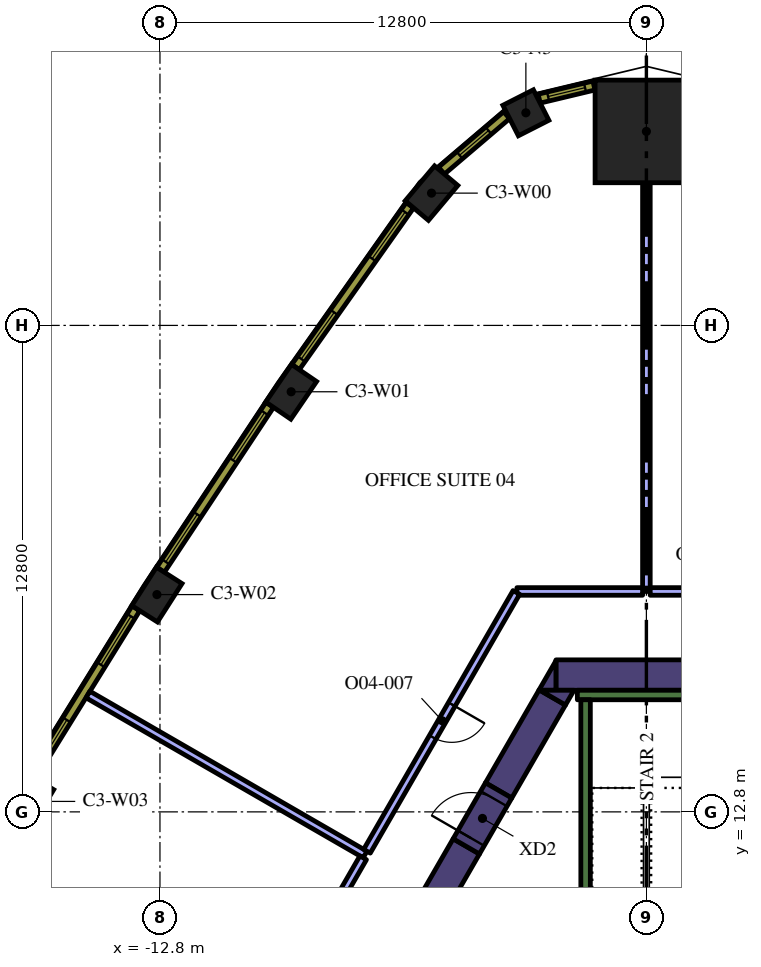
"""IFC4 building model, lengths in metres.
Left out: names, types, materials, properties, quantities, classifications, styles, units other than length and angle.
Written with IfcOpenShell. Run it as: python <this file> out.ifc"""

import sys

from ifc_helpers import new_model, si_unit, direction, frame, frame_2d, origin, origin_2d, place, context, subcontext, project, spatial, polyline, rectangle, outline, extrude, element, fill, save


model = new_model("IFC4")
c1 = context("Model", 3, precision=1e-05, world=origin(), true_north=direction((0.0, 1.0)))
c2 = subcontext(c1, "Body", "Model", "MODEL_VIEW")
j1 = project(units=[si_unit("LENGTHUNIT", "METRE"), si_unit("PLANEANGLEUNIT", "RADIAN")], contexts=[c1])
p1 = place(None, origin())
s1 = spatial("IfcSite", under=j1, at=p1, CompositionType="ELEMENT")
p2 = place(p1, origin())
s2 = spatial("IfcBuilding", under=s1, at=p2, CompositionType="ELEMENT")
p3 = place(p2, frame((0.0, 0.0, 183.6)))
s3 = spatial("IfcBuildingStorey", under=s2, at=p3, CompositionType="ELEMENT", Elevation=183.6)
p4 = place(p3, frame((0.0, 30.704, 0.0), z_axis=(0.0, 0.0, 1.0), x_axis=(0.0, 1.0, 0.0)))
e1 = element("IfcColumn", 1, at=p4, inside=s3, PredefinedType="COLUMN", context=c2, shape_type="SweptSolid", body=[
    extrude(rectangle(XDim=2.7, YDim=2.7, at=origin_2d()), origin(), (0.0, 0.0, 1.0), 4.2),
])
p5 = place(p3, frame((-3.171, 31.195, 0.0), z_axis=(0.0, 0.0, 1.0), x_axis=(-0.891486197647, -0.453047855535, 0.0)))
e2 = element("IfcColumn", 2, at=p5, inside=s3, PredefinedType="COLUMN", context=c2, shape_type="SweptSolid", body=[
    extrude(rectangle(XDim=0.9, YDim=0.9, at=origin_2d()), origin(), (0.0, 0.0, 1.0), 4.2),
])
for number, where, z_axis, x_axis in (
    (3, (-5.654, 29.081, 0.0), (0.0, 0.0, 1.0), (-0.644, -0.765, 0.0)),
    (4, (-9.348, 23.854, 0.0), (0.0, 0.0, 1.0), (-0.565, -0.825, 0.0)),
    (5, (-12.88, 18.517, 0.0), (0.0, 0.0, 1.0), (-0.539, -0.842, 0.0)),
    (6, (-16.247, 13.075, 0.0), (0.0, 0.0, 1.0), (-0.513, -0.858, 0.0)),
):
    element("IfcColumn", number, at=place(p3, frame(where, z_axis=z_axis, x_axis=x_axis)), inside=s3, PredefinedType="COLUMN", context=c2, shape_type="SweptSolid", body=[
        extrude(rectangle(XDim=1.2, YDim=0.8, at=origin_2d()), origin(), (0.0, 0.0, 1.0), 4.2),
    ])
p6 = place(p3, frame((-2.379, 16.4, 0.0), z_axis=(0.0, 0.0, 1.0), x_axis=(1.0, 0.0, 0.0)))
e7 = element("IfcWall", 7, at=p6, inside=s3, PredefinedType="SOLIDWALL", context=c2, shape_type="SweptSolid", body=[
    extrude(rectangle(XDim=3.824, YDim=0.8, at=frame_2d((1.912, 0.0))), origin(), (0.0, 0.0, 1.0), 4.2),
])
p7 = place(p3, origin())
e8 = element("IfcWall", 8, at=p7, inside=s3, PredefinedType="SOLIDWALL", context=c2, shape_type="SweptSolid", body=[
    extrude(outline(polyline([(-2.829, 16.0), (-2.381, 16.776), (-2.381, 16.0), (-2.829, 16.0)])), origin(), (0.0, 0.0, 1.0), 4.2),
])
p8 = place(p3, frame((-2.477, 15.81, 0.0), z_axis=(0.0, 0.0, 1.0), x_axis=(-0.499969377405, -0.866043083026, 0.0)))
e9 = element("IfcWall", 9, at=p8, inside=s3, PredefinedType="SOLIDWALL", context=c2, shape_type="SweptSolid", body=[
    extrude(rectangle(XDim=2.824, YDim=0.8, at=frame_2d((1.412, 0.0))), origin(), (0.0, 0.0, 1.0), 4.2),
])
e10 = element("IfcWall", 10, at=p7, inside=s3, PredefinedType="SOLIDWALL", context=c2, shape_type="SweptSolid", body=[
    extrude(outline(polyline([(-1.905, 16.0), (-2.129, 15.612), (-2.801, 16.0), (-1.905, 16.0)])), origin(), (0.0, 0.0, 1.0), 4.2),
])
p9 = place(p3, frame((-12.668, -1.842, 0.0), z_axis=(0.0, 0.0, 1.0), x_axis=(0.500003640647, 0.866023301845, 0.0)))
e11 = element("IfcWall", 11, at=p9, inside=s3, PredefinedType="SOLIDWALL", context=c2, shape_type="SweptSolid", body=[
    extrude(rectangle(XDim=15.858, YDim=0.8, at=frame_2d((7.929, 0.0))), origin(), (0.0, 0.0, 1.0), 4.2),
])
p10 = place(p3, frame((-1.817, 15.875, 0.0), z_axis=(0.0, 0.0, 1.0), x_axis=(1.0, 0.0, 0.0)))
e12 = element("IfcWall", 12, at=p10, inside=s3, PredefinedType="SOLIDWALL", context=c2, shape_type="SweptSolid", body=[
    extrude(rectangle(XDim=3.634, YDim=0.25, at=frame_2d((1.817, 0.0))), origin(), (0.0, 0.0, 1.0), 4.2),
])
p11 = place(p3, frame((-1.6, 8.7, 0.0), z_axis=(0.0, 0.0, 1.0), x_axis=(0.0, 1.0, 0.0)))
e13 = element("IfcWall", 13, at=p11, inside=s3, PredefinedType="SOLIDWALL", context=c2, shape_type="SweptSolid", body=[
    extrude(rectangle(XDim=7.05, YDim=0.25, at=frame_2d((3.525, 0.0))), origin(), (0.0, 0.0, 1.0), 4.2),
])
p12 = place(p3, frame((-4.739, 11.892, 0.0), z_axis=(0.0, 0.0, 1.0), x_axis=(0.500062241894, 0.865989465428, 0.0)))
e14 = element("IfcWall", 14, at=p12, inside=s3, PredefinedType="SOLIDWALL", context=c2, shape_type="SweptSolid", body=[
    extrude(rectangle(XDim=1.7, YDim=0.8, at=frame_2d((0.85, 0.0))), origin(), (0.0, 0.0, 1.0), 4.2),
])
p13 = place(p12, frame((0.25, 0.0, 0.0)))
e15 = element("IfcOpeningElement", 15, at=p13, cuts=e14, PredefinedType="OPENING", context=c2, shape_type="SweptSolid", body=[
    extrude(rectangle(XDim=1.2, YDim=2.1, at=frame_2d((0.6, 1.05))), frame((0.0, 0.41, 0.0), z_axis=(0.0, -1.0, 0.0), x_axis=(1.0, 0.0, 0.0)), (0.0, 0.0, 1.0), 0.82),
])
p14 = place(p3, frame((0.0, 18.6, 0.0), z_axis=(0.0, 0.0, 1.0), x_axis=(0.0, 1.0, 0.0)))
e16 = element("IfcWall", 16, at=p14, inside=s3, PredefinedType="PARTITIONING", context=c2, shape_type="SweptSolid", body=[
    extrude(rectangle(XDim=10.754, YDim=0.2, at=frame_2d((5.377, 0.0))), origin(), (0.0, 0.0, 1.0), 3.15),
])
p15 = place(p3, frame((3.274, 18.6, 0.0), z_axis=(0.0, 0.0, 1.0), x_axis=(-1.0, 0.0, 0.0)))
e17 = element("IfcWall", 17, at=p15, inside=s3, PredefinedType="PARTITIONING", context=c2, shape_type="SweptSolid", body=[
    extrude(rectangle(XDim=3.174, YDim=0.2, at=frame_2d((1.587, 0.0))), origin(), (0.0, 0.0, 1.0), 3.15),
])
p16 = place(p15, frame((1.1, 0.0, 0.0)))
e18 = element("IfcOpeningElement", 18, at=p16, cuts=e17, PredefinedType="OPENING", context=c2, shape_type="SweptSolid", body=[
    extrude(rectangle(XDim=1.0, YDim=2.1, at=frame_2d((0.5, 1.05))), frame((0.0, 0.11, 0.0), z_axis=(0.0, -1.0, 0.0), x_axis=(1.0, 0.0, 0.0)), (0.0, 0.0, 1.0), 0.22),
])
p17 = place(p3, frame((-7.403, 11.678, 0.0), z_axis=(0.0, 0.0, 1.0), x_axis=(-0.866029143232, 0.499993523031, 0.0)))
e19 = element("IfcWall", 19, at=p17, inside=s3, PredefinedType="PARTITIONING", context=c2, shape_type="SweptSolid", body=[
    extrude(rectangle(XDim=8.42, YDim=0.2, at=frame_2d((4.21, 0.0))), origin(), (0.0, 0.0, 1.0), 3.15),
])
p18 = place(p3, frame((-0.1, 18.6, 0.0), z_axis=(0.0, 0.0, 1.0), x_axis=(-1.0, 0.0, 0.0)))
e20 = element("IfcWall", 20, at=p18, inside=s3, PredefinedType="PARTITIONING", context=c2, shape_type="SweptSolid", body=[
    extrude(rectangle(XDim=3.306, YDim=0.2, at=frame_2d((1.653, 0.0))), origin(), (0.0, 0.0, 1.0), 3.15),
])
p19 = place(p3, frame((-3.421, 18.574, 0.0), z_axis=(0.0, 0.0, 1.0), x_axis=(-0.499989434416, -0.866031503741, 0.0)))
e21 = element("IfcWall", 21, at=p19, inside=s3, PredefinedType="PARTITIONING", context=c2, shape_type="SweptSolid", body=[
    extrude(rectangle(XDim=7.863, YDim=0.2, at=frame_2d((3.932, 0.0))), origin(), (0.0, 0.0, 1.0), 3.15),
])
p20 = place(p19, frame((3.4, 0.0, 0.0)))
e22 = element("IfcOpeningElement", 22, at=p20, cuts=e21, PredefinedType="OPENING", context=c2, shape_type="SweptSolid", body=[
    extrude(rectangle(XDim=1.0, YDim=2.1, at=frame_2d((0.5, 1.05))), frame((0.0, 0.11, 0.0), z_axis=(0.0, -1.0, 0.0), x_axis=(1.0, 0.0, 0.0)), (0.0, 0.0, 1.0), 0.22),
])
p21 = place(p3, frame((-7.453, 11.591, 0.0), z_axis=(0.0, 0.0, 1.0), x_axis=(-0.499980749935, -0.866036517529, 0.0)))
e23 = element("IfcWall", 23, at=p21, inside=s3, PredefinedType="PARTITIONING", context=c2, shape_type="SweptSolid", body=[
    extrude(rectangle(XDim=2.782, YDim=0.2, at=frame_2d((1.391, 0.0))), origin(), (0.0, 0.0, 1.0), 3.15),
])
p22 = place(p3, frame((-1.38, 31.912, 0.0), z_axis=(0.0, 0.0, 1.0), x_axis=(-0.972479955788, -0.232986556673, 0.0)))
e24 = element("IfcWall", 24, at=p22, inside=s3, PredefinedType="SOLIDWALL", context=c2, shape_type="SweptSolid", body=[
    extrude(rectangle(XDim=1.482, YDim=0.24, at=frame_2d((0.741, 0.0))), origin(), (0.0, 0.0, 1.0), 3.95),
])
p23 = place(p22, frame((0.241, 0.0, 0.9)))
e25 = element("IfcOpeningElement", 25, at=p23, cuts=e24, PredefinedType="OPENING", context=c2, shape_type="SweptSolid", body=[
    extrude(rectangle(XDim=1.0, YDim=2.55, at=frame_2d((0.5, 1.275))), frame((0.0, 0.13, 0.0), z_axis=(0.0, -1.0, 0.0), x_axis=(1.0, 0.0, 0.0)), (0.0, 0.0, 1.0), 0.26),
])
p24 = place(p3, frame((-3.678, 31.131, 0.0), z_axis=(0.0, 0.0, 1.0), x_axis=(-0.761419744247, -0.648259186645, 0.0)))
e26 = element("IfcWall", 26, at=p24, inside=s3, PredefinedType="SOLIDWALL", context=c2, shape_type="SweptSolid", body=[
    extrude(rectangle(XDim=2.25, YDim=0.24, at=frame_2d((1.125, 0.0))), origin(), (0.0, 0.0, 1.0), 3.95),
])
p25 = place(p24, frame((0.625, 0.0, 0.9)))
e27 = element("IfcOpeningElement", 27, at=p25, cuts=e26, PredefinedType="OPENING", context=c2, shape_type="SweptSolid", body=[
    extrude(rectangle(XDim=1.0, YDim=2.55, at=frame_2d((0.5, 1.275))), frame((0.0, 0.13, 0.0), z_axis=(0.0, -1.0, 0.0), x_axis=(1.0, 0.0, 0.0)), (0.0, 0.0, 1.0), 0.26),
])
p26 = place(p3, frame((-6.223, 28.762, 0.0), z_axis=(0.0, 0.0, 1.0), x_axis=(-0.577115207679, -0.816662743772, 0.0)))
e28 = element("IfcWall", 28, at=p26, inside=s3, PredefinedType="SOLIDWALL", context=c2, shape_type="SweptSolid", body=[
    extrude(rectangle(XDim=5.213, YDim=0.24, at=frame_2d((2.606, 0.0))), origin(), (0.0, 0.0, 1.0), 3.95),
])
p27 = place(p26, frame((0.221, 0.0, 0.9)))
e29 = element("IfcOpeningElement", 29, at=p27, cuts=e28, PredefinedType="OPENING", context=c2, shape_type="SweptSolid", body=[
    extrude(rectangle(XDim=1.5, YDim=2.55, at=frame_2d((0.75, 1.275))), frame((0.0, 0.13, 0.0), z_axis=(0.0, -1.0, 0.0), x_axis=(1.0, 0.0, 0.0)), (0.0, 0.0, 1.0), 0.26),
])
p28 = place(p26, frame((3.452, 0.0, 0.9)))
e30 = element("IfcOpeningElement", 30, at=p28, cuts=e28, PredefinedType="OPENING", context=c2, shape_type="SweptSolid", body=[
    extrude(rectangle(XDim=1.5, YDim=2.55, at=frame_2d((0.75, 1.275))), frame((0.0, 0.13, 0.0), z_axis=(0.0, -1.0, 0.0), x_axis=(1.0, 0.0, 0.0)), (0.0, 0.0, 1.0), 0.26),
])
p29 = place(p3, frame((-9.911, 23.51, 0.0), z_axis=(0.0, 0.0, 1.0), x_axis=(-0.551892811511, -0.833915058386, 0.0)))
e31 = element("IfcWall", 31, at=p29, inside=s3, PredefinedType="SOLIDWALL", context=c2, shape_type="SweptSolid", body=[
    extrude(rectangle(XDim=5.204, YDim=0.24, at=frame_2d((2.602, 0.0))), origin(), (0.0, 0.0, 1.0), 3.95),
])
p30 = place(p29, frame((0.248, 0.0, 0.9)))
e32 = element("IfcOpeningElement", 32, at=p30, cuts=e31, PredefinedType="OPENING", context=c2, shape_type="SweptSolid", body=[
    extrude(rectangle(XDim=1.5, YDim=2.55, at=frame_2d((0.75, 1.275))), frame((0.0, 0.13, 0.0), z_axis=(0.0, -1.0, 0.0), x_axis=(1.0, 0.0, 0.0)), (0.0, 0.0, 1.0), 0.26),
])
p31 = place(p29, frame((3.455, 0.0, 0.9)))
e33 = element("IfcOpeningElement", 33, at=p31, cuts=e31, PredefinedType="OPENING", context=c2, shape_type="SweptSolid", body=[
    extrude(rectangle(XDim=1.5, YDim=2.55, at=frame_2d((0.75, 1.275))), frame((0.0, 0.13, 0.0), z_axis=(0.0, -1.0, 0.0), x_axis=(1.0, 0.0, 0.0)), (0.0, 0.0, 1.0), 0.26),
])
p32 = place(p3, frame((-13.433, 18.156, 0.0), z_axis=(0.0, 0.0, 1.0), x_axis=(-0.526197926587, -0.850362124072, 0.0)))
e34 = element("IfcWall", 34, at=p32, inside=s3, PredefinedType="SOLIDWALL", context=c2, shape_type="SweptSolid", body=[
    extrude(rectangle(XDim=5.203, YDim=0.24, at=frame_2d((2.602, 0.0))), origin(), (0.0, 0.0, 1.0), 3.95),
])
p33 = place(p32, frame((0.248, 0.0, 0.9)))
e35 = element("IfcOpeningElement", 35, at=p33, cuts=e34, PredefinedType="OPENING", context=c2, shape_type="SweptSolid", body=[
    extrude(rectangle(XDim=1.5, YDim=2.55, at=frame_2d((0.75, 1.275))), frame((0.0, 0.13, 0.0), z_axis=(0.0, -1.0, 0.0), x_axis=(1.0, 0.0, 0.0)), (0.0, 0.0, 1.0), 0.26),
])
p34 = place(p32, frame((3.455, 0.0, 0.9)))
e36 = element("IfcOpeningElement", 36, at=p34, cuts=e34, PredefinedType="OPENING", context=c2, shape_type="SweptSolid", body=[
    extrude(rectangle(XDim=1.5, YDim=2.55, at=frame_2d((0.75, 1.275))), frame((0.0, 0.13, 0.0), z_axis=(0.0, -1.0, 0.0), x_axis=(1.0, 0.0, 0.0)), (0.0, 0.0, 1.0), 0.26),
])
p35 = place(p13, origin())
e37 = element("IfcDoor", 37, at=p35, inside=s3, OperationType="SINGLE_SWING_LEFT", PredefinedType="DOOR", context=c2, shape_type="SweptSolid", body=[
    extrude(rectangle(XDim=1.2, YDim=2.1, at=frame_2d((0.6, 1.05))), frame((0.0, 0.025, 0.0), z_axis=(0.0, -1.0, 0.0), x_axis=(1.0, 0.0, 0.0)), (0.0, 0.0, 1.0), 0.05),
])
fill(e15, e37)
p36 = place(p20, origin())
e38 = element("IfcDoor", 38, at=p36, inside=s3, OperationType="SINGLE_SWING_LEFT", PredefinedType="DOOR", context=c2, shape_type="SweptSolid", body=[
    extrude(rectangle(XDim=1.0, YDim=2.1, at=frame_2d((0.5, 1.05))), frame((0.0, 0.025, 0.0), z_axis=(0.0, -1.0, 0.0), x_axis=(1.0, 0.0, 0.0)), (0.0, 0.0, 1.0), 0.05),
])
fill(e22, e38)
p37 = place(p23, origin())
e39 = element("IfcWindow", 39, at=p37, inside=s3, PartitioningType="SINGLE_PANEL", PredefinedType="WINDOW", context=c2, shape_type="SweptSolid", body=[
    extrude(rectangle(XDim=1.0, YDim=2.55, at=frame_2d((0.5, 1.275))), frame((0.0, 0.04, 0.0), z_axis=(0.0, -1.0, 0.0), x_axis=(1.0, 0.0, 0.0)), (0.0, 0.0, 1.0), 0.06),
])
fill(e25, e39)
p38 = place(p25, origin())
e40 = element("IfcWindow", 40, at=p38, inside=s3, PartitioningType="SINGLE_PANEL", PredefinedType="WINDOW", context=c2, shape_type="SweptSolid", body=[
    extrude(rectangle(XDim=1.0, YDim=2.55, at=frame_2d((0.5, 1.275))), frame((0.0, 0.04, 0.0), z_axis=(0.0, -1.0, 0.0), x_axis=(1.0, 0.0, 0.0)), (0.0, 0.0, 1.0), 0.06),
])
fill(e27, e40)
p39 = place(p27, origin())
e41 = element("IfcWindow", 41, at=p39, inside=s3, PartitioningType="SINGLE_PANEL", PredefinedType="WINDOW", context=c2, shape_type="SweptSolid", body=[
    extrude(rectangle(XDim=1.5, YDim=2.55, at=frame_2d((0.75, 1.275))), frame((0.0, 0.04, 0.0), z_axis=(0.0, -1.0, 0.0), x_axis=(1.0, 0.0, 0.0)), (0.0, 0.0, 1.0), 0.06),
])
fill(e29, e41)
p40 = place(p28, origin())
e42 = element("IfcWindow", 42, at=p40, inside=s3, PartitioningType="SINGLE_PANEL", PredefinedType="WINDOW", context=c2, shape_type="SweptSolid", body=[
    extrude(rectangle(XDim=1.5, YDim=2.55, at=frame_2d((0.75, 1.275))), frame((0.0, 0.04, 0.0), z_axis=(0.0, -1.0, 0.0), x_axis=(1.0, 0.0, 0.0)), (0.0, 0.0, 1.0), 0.06),
])
fill(e30, e42)
p41 = place(p30, origin())
e43 = element("IfcWindow", 43, at=p41, inside=s3, PartitioningType="SINGLE_PANEL", PredefinedType="WINDOW", context=c2, shape_type="SweptSolid", body=[
    extrude(rectangle(XDim=1.5, YDim=2.55, at=frame_2d((0.75, 1.275))), frame((0.0, 0.04, 0.0), z_axis=(0.0, -1.0, 0.0), x_axis=(1.0, 0.0, 0.0)), (0.0, 0.0, 1.0), 0.06),
])
fill(e32, e43)
p42 = place(p31, origin())
e44 = element("IfcWindow", 44, at=p42, inside=s3, PartitioningType="SINGLE_PANEL", PredefinedType="WINDOW", context=c2, shape_type="SweptSolid", body=[
    extrude(rectangle(XDim=1.5, YDim=2.55, at=frame_2d((0.75, 1.275))), frame((0.0, 0.04, 0.0), z_axis=(0.0, -1.0, 0.0), x_axis=(1.0, 0.0, 0.0)), (0.0, 0.0, 1.0), 0.06),
])
fill(e33, e44)
p43 = place(p33, origin())
e45 = element("IfcWindow", 45, at=p43, inside=s3, PartitioningType="SINGLE_PANEL", PredefinedType="WINDOW", context=c2, shape_type="SweptSolid", body=[
    extrude(rectangle(XDim=1.5, YDim=2.55, at=frame_2d((0.75, 1.275))), frame((0.0, 0.04, 0.0), z_axis=(0.0, -1.0, 0.0), x_axis=(1.0, 0.0, 0.0)), (0.0, 0.0, 1.0), 0.06),
])
fill(e35, e45)
p44 = place(p34, origin())
e46 = element("IfcWindow", 46, at=p44, inside=s3, PartitioningType="SINGLE_PANEL", PredefinedType="WINDOW", context=c2, shape_type="SweptSolid", body=[
    extrude(rectangle(XDim=1.5, YDim=2.55, at=frame_2d((0.75, 1.275))), frame((0.0, 0.04, 0.0), z_axis=(0.0, -1.0, 0.0), x_axis=(1.0, 0.0, 0.0)), (0.0, 0.0, 1.0), 0.06),
])
fill(e36, e46)
save(model, sys.argv[1])
